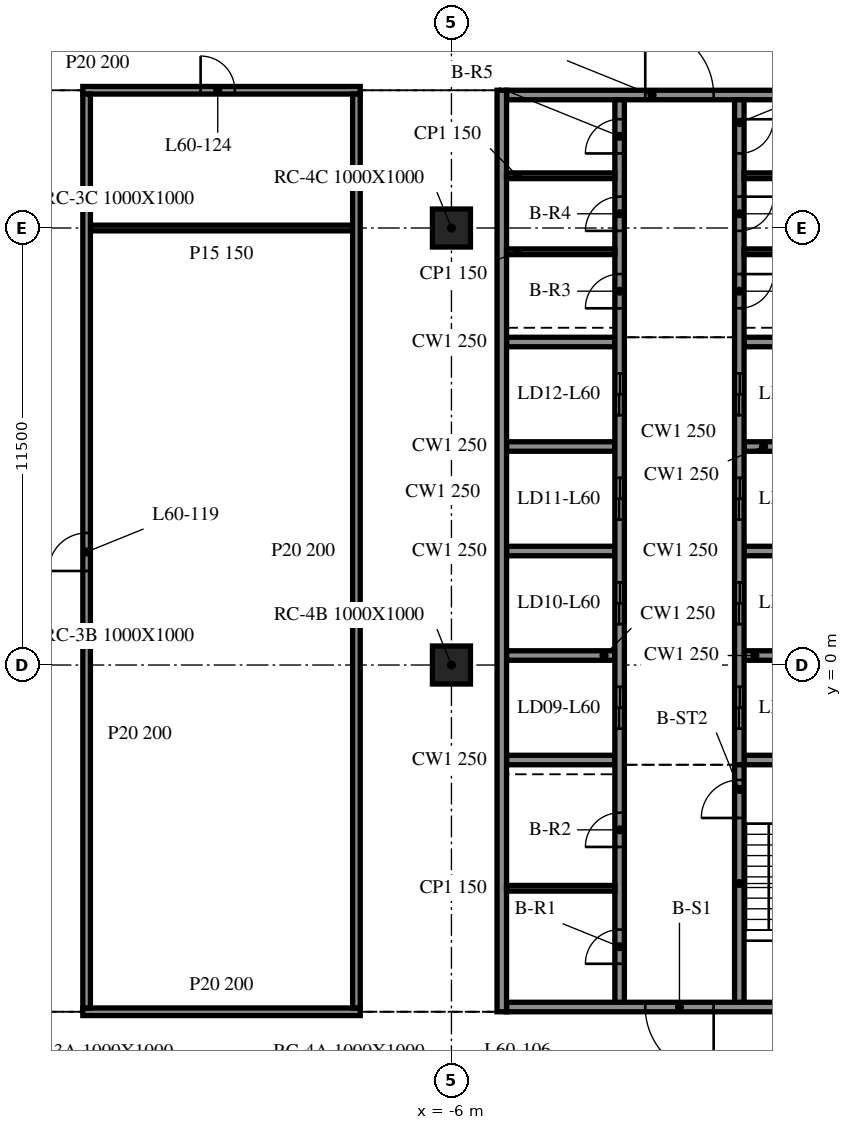
"""IFC4 building model, lengths in metres.
Left out: names, types, materials, properties, quantities, classifications, styles, units other than length and angle.
Written with IfcOpenShell. Run it as: python <this file> out.ifc"""

import sys

from ifc_helpers import new_model, si_unit, direction, frame, frame_2d, origin, origin_2d, place, context, subcontext, project, spatial, rectangle, extrude, element, fill, save


model = new_model("IFC4")
c1 = context("Model", 3, precision=1e-05, world=origin(), true_north=direction((0.0, 1.0)))
c2 = subcontext(c1, "Body", "Model", "MODEL_VIEW")
j1 = project(units=[si_unit("LENGTHUNIT", "METRE"), si_unit("PLANEANGLEUNIT", "RADIAN")], contexts=[c1])
p1 = place(None, origin())
s1 = spatial("IfcSite", under=j1, at=p1, CompositionType="ELEMENT")
p2 = place(p1, origin())
s2 = spatial("IfcBuilding", under=s1, at=p2, CompositionType="ELEMENT")
p3 = place(p2, frame((0.0, 0.0, 247.6)))
s3 = spatial("IfcBuildingStorey", under=s2, at=p3, CompositionType="ELEMENT", Elevation=247.6)
for number, where, z_axis, x_axis in (
    (1, (-6.0, 0.0, -0.34), (0.0, 0.0, 1.0), (1.0, 0.0, 0.0)),
    (2, (-6.0, 11.5, -0.34), (0.0, 0.0, 1.0), (1.0, 0.0, 0.0)),
):
    element("IfcColumn", number, at=place(p3, frame(where, z_axis=z_axis, x_axis=x_axis)), inside=s3, PredefinedType="COLUMN", context=c2, shape_type="SweptSolid", body=[
        extrude(rectangle(XDim=1.0, YDim=1.0, at=origin_2d()), origin(), (0.0, 0.0, 1.0), 3.8),
    ])
p4 = place(p3, frame((-4.675, 15.125, 0.0), z_axis=(0.0, 0.0, 1.0), x_axis=(0.0, -1.0, 0.0)))
e3 = element("IfcWall", 3, at=p4, inside=s3, PredefinedType="SOLIDWALL", context=c2, shape_type="SweptSolid", body=[
    extrude(rectangle(XDim=24.25, YDim=0.25, at=frame_2d((12.125, 0.0))), origin(), (0.0, 0.0, 1.0), 3.46),
])
p5 = place(p3, frame((4.55, -9.0, 0.0), z_axis=(0.0, 0.0, 1.0), x_axis=(-1.0, 0.0, 0.0)))
e4 = element("IfcWall", 4, at=p5, inside=s3, PredefinedType="SOLIDWALL", context=c2, shape_type="SweptSolid", body=[
    extrude(rectangle(XDim=9.1, YDim=0.25, at=frame_2d((4.55, 0.0))), origin(), (0.0, 0.0, 1.0), 3.46),
])
p6 = place(p5, frame((3.65, 0.0, 0.0)))
e5 = element("IfcOpeningElement", 5, at=p6, cuts=e4, PredefinedType="OPENING", context=c2, shape_type="SweptSolid", body=[
    extrude(rectangle(XDim=1.8, YDim=2.1, at=frame_2d((0.9, 1.05))), frame((0.0, 0.135, 0.0), z_axis=(0.0, -1.0, 0.0), x_axis=(1.0, 0.0, 0.0)), (0.0, 0.0, 1.0), 0.27),
])
p7 = place(p3, frame((-4.55, 15.0, 0.0), z_axis=(0.0, 0.0, 1.0), x_axis=(1.0, 0.0, 0.0)))
e6 = element("IfcWall", 6, at=p7, inside=s3, PredefinedType="SOLIDWALL", context=c2, shape_type="SweptSolid", body=[
    extrude(rectangle(XDim=9.1, YDim=0.25, at=frame_2d((4.55, 0.0))), origin(), (0.0, 0.0, 1.0), 3.46),
])
p8 = place(p7, frame((3.65, 0.0, 0.0)))
e7 = element("IfcOpeningElement", 7, at=p8, cuts=e6, PredefinedType="OPENING", context=c2, shape_type="SweptSolid", body=[
    extrude(rectangle(XDim=1.8, YDim=2.1, at=frame_2d((0.9, 1.05))), frame((0.0, 0.135, 0.0), z_axis=(0.0, -1.0, 0.0), x_axis=(1.0, 0.0, 0.0)), (0.0, 0.0, 1.0), 0.27),
])
p9 = place(p3, frame((-1.575, -8.875, 0.0), z_axis=(0.0, 0.0, 1.0), x_axis=(0.0, 1.0, 0.0)))
e8 = element("IfcWall", 8, at=p9, inside=s3, PredefinedType="SOLIDWALL", context=c2, shape_type="SweptSolid", body=[
    extrude(rectangle(XDim=23.75, YDim=0.25, at=frame_2d((11.875, 0.0))), origin(), (0.0, 0.0, 1.0), 3.46),
])
p10 = place(p9, frame((7.2, 0.0, 0.0)))
e9 = element("IfcOpeningElement", 9, at=p10, cuts=e8, PredefinedType="OPENING", context=c2, shape_type="SweptSolid", body=[
    extrude(rectangle(XDim=1.1, YDim=2.1, at=frame_2d((0.55, 1.05))), frame((0.0, 0.135, 0.0), z_axis=(0.0, -1.0, 0.0), x_axis=(1.0, 0.0, 0.0)), (0.0, 0.0, 1.0), 0.27),
])
p11 = place(p9, frame((9.95, 0.0, 0.0)))
e10 = element("IfcOpeningElement", 10, at=p11, cuts=e8, PredefinedType="OPENING", context=c2, shape_type="SweptSolid", body=[
    extrude(rectangle(XDim=1.1, YDim=2.1, at=frame_2d((0.55, 1.05))), frame((0.0, 0.135, 0.0), z_axis=(0.0, -1.0, 0.0), x_axis=(1.0, 0.0, 0.0)), (0.0, 0.0, 1.0), 0.27),
])
p12 = place(p9, frame((12.7, 0.0, 0.0)))
e11 = element("IfcOpeningElement", 11, at=p12, cuts=e8, PredefinedType="OPENING", context=c2, shape_type="SweptSolid", body=[
    extrude(rectangle(XDim=1.1, YDim=2.1, at=frame_2d((0.55, 1.05))), frame((0.0, 0.135, 0.0), z_axis=(0.0, -1.0, 0.0), x_axis=(1.0, 0.0, 0.0)), (0.0, 0.0, 1.0), 0.27),
])
p13 = place(p9, frame((15.45, 0.0, 0.0)))
e12 = element("IfcOpeningElement", 12, at=p13, cuts=e8, PredefinedType="OPENING", context=c2, shape_type="SweptSolid", body=[
    extrude(rectangle(XDim=1.1, YDim=2.1, at=frame_2d((0.55, 1.05))), frame((0.0, 0.135, 0.0), z_axis=(0.0, -1.0, 0.0), x_axis=(1.0, 0.0, 0.0)), (0.0, 0.0, 1.0), 0.27),
])
p14 = place(p9, frame((1.012, 0.0, 0.0)))
e13 = element("IfcOpeningElement", 13, at=p14, cuts=e8, PredefinedType="OPENING", context=c2, shape_type="SweptSolid", body=[
    extrude(rectangle(XDim=0.9, YDim=2.1, at=frame_2d((0.45, 1.05))), frame((0.0, 0.135, 0.0), z_axis=(0.0, -1.0, 0.0), x_axis=(1.0, 0.0, 0.0)), (0.0, 0.0, 1.0), 0.27),
])
p15 = place(p9, frame((4.087, 0.0, 0.0)))
e14 = element("IfcOpeningElement", 14, at=p15, cuts=e8, PredefinedType="OPENING", context=c2, shape_type="SweptSolid", body=[
    extrude(rectangle(XDim=0.9, YDim=2.1, at=frame_2d((0.45, 1.05))), frame((0.0, 0.135, 0.0), z_axis=(0.0, -1.0, 0.0), x_axis=(1.0, 0.0, 0.0)), (0.0, 0.0, 1.0), 0.27),
])
p16 = place(p9, frame((18.262, 0.0, 0.0)))
e15 = element("IfcOpeningElement", 15, at=p16, cuts=e8, PredefinedType="OPENING", context=c2, shape_type="SweptSolid", body=[
    extrude(rectangle(XDim=0.9, YDim=2.1, at=frame_2d((0.45, 1.05))), frame((0.0, 0.135, 0.0), z_axis=(0.0, -1.0, 0.0), x_axis=(1.0, 0.0, 0.0)), (0.0, 0.0, 1.0), 0.27),
])
p17 = place(p9, frame((20.3, 0.0, 0.0)))
e16 = element("IfcOpeningElement", 16, at=p17, cuts=e8, PredefinedType="OPENING", context=c2, shape_type="SweptSolid", body=[
    extrude(rectangle(XDim=0.9, YDim=2.1, at=frame_2d((0.45, 1.05))), frame((0.0, 0.135, 0.0), z_axis=(0.0, -1.0, 0.0), x_axis=(1.0, 0.0, 0.0)), (0.0, 0.0, 1.0), 0.27),
])
p18 = place(p9, frame((22.337, 0.0, 0.0)))
e17 = element("IfcOpeningElement", 17, at=p18, cuts=e8, PredefinedType="OPENING", context=c2, shape_type="SweptSolid", body=[
    extrude(rectangle(XDim=0.9, YDim=2.1, at=frame_2d((0.45, 1.05))), frame((0.0, 0.135, 0.0), z_axis=(0.0, -1.0, 0.0), x_axis=(1.0, 0.0, 0.0)), (0.0, 0.0, 1.0), 0.27),
])
p19 = place(p3, frame((1.575, -8.875, 0.0), z_axis=(0.0, 0.0, 1.0), x_axis=(0.0, 1.0, 0.0)))
e18 = element("IfcWall", 18, at=p19, inside=s3, PredefinedType="SOLIDWALL", context=c2, shape_type="SweptSolid", body=[
    extrude(rectangle(XDim=6.25, YDim=0.25, at=frame_2d((3.125, 0.0))), origin(), (0.0, 0.0, 1.0), 3.46),
])
p20 = place(p19, frame((4.85, 0.0, 0.0)))
e19 = element("IfcOpeningElement", 19, at=p20, cuts=e18, PredefinedType="OPENING", context=c2, shape_type="SweptSolid", body=[
    extrude(rectangle(XDim=1.0, YDim=2.1, at=frame_2d((0.5, 1.05))), frame((0.0, 0.135, 0.0), z_axis=(0.0, -1.0, 0.0), x_axis=(1.0, 0.0, 0.0)), (0.0, 0.0, 1.0), 0.27),
])
p21 = place(p3, frame((1.575, 14.875, 0.0), z_axis=(0.0, 0.0, 1.0), x_axis=(0.0, -1.0, 0.0)))
e20 = element("IfcWall", 20, at=p21, inside=s3, PredefinedType="SOLIDWALL", context=c2, shape_type="SweptSolid", body=[
    extrude(rectangle(XDim=17.5, YDim=0.25, at=frame_2d((8.75, 0.0))), origin(), (0.0, 0.0, 1.0), 3.46),
])
p22 = place(p21, frame((15.45, 0.0, 0.0)))
e21 = element("IfcOpeningElement", 21, at=p22, cuts=e20, PredefinedType="OPENING", context=c2, shape_type="SweptSolid", body=[
    extrude(rectangle(XDim=1.1, YDim=2.1, at=frame_2d((0.55, 1.05))), frame((0.0, 0.135, 0.0), z_axis=(0.0, -1.0, 0.0), x_axis=(1.0, 0.0, 0.0)), (0.0, 0.0, 1.0), 0.27),
])
p23 = place(p21, frame((12.7, 0.0, 0.0)))
e22 = element("IfcOpeningElement", 22, at=p23, cuts=e20, PredefinedType="OPENING", context=c2, shape_type="SweptSolid", body=[
    extrude(rectangle(XDim=1.1, YDim=2.1, at=frame_2d((0.55, 1.05))), frame((0.0, 0.135, 0.0), z_axis=(0.0, -1.0, 0.0), x_axis=(1.0, 0.0, 0.0)), (0.0, 0.0, 1.0), 0.27),
])
p24 = place(p21, frame((9.95, 0.0, 0.0)))
e23 = element("IfcOpeningElement", 23, at=p24, cuts=e20, PredefinedType="OPENING", context=c2, shape_type="SweptSolid", body=[
    extrude(rectangle(XDim=1.1, YDim=2.1, at=frame_2d((0.55, 1.05))), frame((0.0, 0.135, 0.0), z_axis=(0.0, -1.0, 0.0), x_axis=(1.0, 0.0, 0.0)), (0.0, 0.0, 1.0), 0.27),
])
p25 = place(p21, frame((7.2, 0.0, 0.0)))
e24 = element("IfcOpeningElement", 24, at=p25, cuts=e20, PredefinedType="OPENING", context=c2, shape_type="SweptSolid", body=[
    extrude(rectangle(XDim=1.1, YDim=2.1, at=frame_2d((0.55, 1.05))), frame((0.0, 0.135, 0.0), z_axis=(0.0, -1.0, 0.0), x_axis=(1.0, 0.0, 0.0)), (0.0, 0.0, 1.0), 0.27),
])
p26 = place(p21, frame((4.587, 0.0, 0.0)))
e25 = element("IfcOpeningElement", 25, at=p26, cuts=e20, PredefinedType="OPENING", context=c2, shape_type="SweptSolid", body=[
    extrude(rectangle(XDim=0.9, YDim=2.1, at=frame_2d((0.45, 1.05))), frame((0.0, 0.135, 0.0), z_axis=(0.0, -1.0, 0.0), x_axis=(1.0, 0.0, 0.0)), (0.0, 0.0, 1.0), 0.27),
])
p27 = place(p21, frame((2.55, 0.0, 0.0)))
e26 = element("IfcOpeningElement", 26, at=p27, cuts=e20, PredefinedType="OPENING", context=c2, shape_type="SweptSolid", body=[
    extrude(rectangle(XDim=0.9, YDim=2.1, at=frame_2d((0.45, 1.05))), frame((0.0, 0.135, 0.0), z_axis=(0.0, -1.0, 0.0), x_axis=(1.0, 0.0, 0.0)), (0.0, 0.0, 1.0), 0.27),
])
p28 = place(p21, frame((0.512, 0.0, 0.0)))
e27 = element("IfcOpeningElement", 27, at=p28, cuts=e20, PredefinedType="OPENING", context=c2, shape_type="SweptSolid", body=[
    extrude(rectangle(XDim=0.9, YDim=2.1, at=frame_2d((0.45, 1.05))), frame((0.0, 0.135, 0.0), z_axis=(0.0, -1.0, 0.0), x_axis=(1.0, 0.0, 0.0)), (0.0, 0.0, 1.0), 0.27),
])
for number, where, z_axis, x_axis in (
    (28, (-4.55, -2.5, 0.0), (0.0, 0.0, 1.0), (1.0, 0.0, 0.0)),
    (29, (-4.55, 0.25, 0.0), (0.0, 0.0, 1.0), (1.0, 0.0, 0.0)),
    (30, (-4.55, 3.0, 0.0), (0.0, 0.0, 1.0), (1.0, 0.0, 0.0)),
    (31, (-4.55, 5.75, 0.0), (0.0, 0.0, 1.0), (1.0, 0.0, 0.0)),
    (32, (-4.55, 8.5, 0.0), (0.0, 0.0, 1.0), (1.0, 0.0, 0.0)),
    (33, (1.7, -2.5, 0.0), (0.0, 0.0, 1.0), (1.0, 0.0, 0.0)),
    (34, (1.7, 0.25, 0.0), (0.0, 0.0, 1.0), (1.0, 0.0, 0.0)),
    (35, (1.7, 3.0, 0.0), (0.0, 0.0, 1.0), (1.0, 0.0, 0.0)),
    (36, (1.7, 5.75, 0.0), (0.0, 0.0, 1.0), (1.0, 0.0, 0.0)),
    (37, (1.7, 8.5, 0.0), (0.0, 0.0, 1.0), (1.0, 0.0, 0.0)),
):
    element("IfcWall", number, at=place(p3, frame(where, z_axis=z_axis, x_axis=x_axis)), inside=s3, PredefinedType="SOLIDWALL", context=c2, shape_type="SweptSolid", body=[
        extrude(rectangle(XDim=2.85, YDim=0.25, at=frame_2d((1.425, 0.0))), origin(), (0.0, 0.0, 1.0), 3.46),
    ])
for number, where, z_axis, x_axis in (
    (38, (-4.55, -5.875, 0.0), (0.0, 0.0, 1.0), (1.0, 0.0, 0.0)),
    (39, (-4.55, 10.875, 0.0), (0.0, 0.0, 1.0), (1.0, 0.0, 0.0)),
    (40, (-4.55, 12.875, 0.0), (0.0, 0.0, 1.0), (1.0, 0.0, 0.0)),
    (41, (1.7, 10.875, 0.0), (0.0, 0.0, 1.0), (1.0, 0.0, 0.0)),
    (42, (1.7, 12.875, 0.0), (0.0, 0.0, 1.0), (1.0, 0.0, 0.0)),
):
    element("IfcWall", number, at=place(p3, frame(where, z_axis=z_axis, x_axis=x_axis)), inside=s3, PredefinedType="PARTITIONING", context=c2, shape_type="SweptSolid", body=[
        extrude(rectangle(XDim=2.85, YDim=0.15, at=frame_2d((1.425, 0.0))), origin(), (0.0, 0.0, 1.0), 3.46),
    ])
p29 = place(p3, frame((-15.7, -9.125, 0.0), z_axis=(0.0, 0.0, 1.0), x_axis=(1.0, 0.0, 0.0)))
e43 = element("IfcWall", 43, at=p29, inside=s3, PredefinedType="PARTITIONING", context=c2, shape_type="SweptSolid", body=[
    extrude(rectangle(XDim=7.3, YDim=0.2, at=frame_2d((3.65, 0.0))), origin(), (0.0, 0.0, 1.0), 3.46),
])
p30 = place(p3, frame((-15.5, 11.5, 0.0), z_axis=(0.0, 0.0, 1.0), x_axis=(1.0, 0.0, 0.0)))
e44 = element("IfcWall", 44, at=p30, inside=s3, PredefinedType="PARTITIONING", context=c2, shape_type="SweptSolid", body=[
    extrude(rectangle(XDim=6.9, YDim=0.15, at=frame_2d((3.45, 0.0))), origin(), (0.0, 0.0, 1.0), 3.46),
])
p31 = place(p3, frame((-15.7, 15.125, 0.0), z_axis=(0.0, 0.0, 1.0), x_axis=(1.0, 0.0, 0.0)))
e45 = element("IfcWall", 45, at=p31, inside=s3, PredefinedType="PARTITIONING", context=c2, shape_type="SweptSolid", body=[
    extrude(rectangle(XDim=7.3, YDim=0.2, at=frame_2d((3.65, 0.0))), origin(), (0.0, 0.0, 1.0), 3.46),
])
p32 = place(p31, frame((3.1, 0.0, 0.0)))
e46 = element("IfcOpeningElement", 46, at=p32, cuts=e45, PredefinedType="OPENING", context=c2, shape_type="SweptSolid", body=[
    extrude(rectangle(XDim=0.9, YDim=2.1, at=frame_2d((0.45, 1.05))), frame((0.0, 0.11, 0.0), z_axis=(0.0, -1.0, 0.0), x_axis=(1.0, 0.0, 0.0)), (0.0, 0.0, 1.0), 0.22),
])
p33 = place(p3, frame((-15.6, -9.025, 0.0), z_axis=(0.0, 0.0, 1.0), x_axis=(0.0, 1.0, 0.0)))
e47 = element("IfcWall", 47, at=p33, inside=s3, PredefinedType="PARTITIONING", context=c2, shape_type="SweptSolid", body=[
    extrude(rectangle(XDim=24.05, YDim=0.2, at=frame_2d((12.025, 0.0))), origin(), (0.0, 0.0, 1.0), 3.46),
])
p34 = place(p33, frame((11.5, 0.0, 0.0)))
e48 = element("IfcOpeningElement", 48, at=p34, cuts=e47, PredefinedType="OPENING", context=c2, shape_type="SweptSolid", body=[
    extrude(rectangle(XDim=1.0, YDim=2.1, at=frame_2d((0.5, 1.05))), frame((0.0, 0.11, 0.0), z_axis=(0.0, -1.0, 0.0), x_axis=(1.0, 0.0, 0.0)), (0.0, 0.0, 1.0), 0.22),
])
p35 = place(p3, frame((-8.5, -9.025, 0.0), z_axis=(0.0, 0.0, 1.0), x_axis=(0.0, 1.0, 0.0)))
e49 = element("IfcWall", 49, at=p35, inside=s3, PredefinedType="PARTITIONING", context=c2, shape_type="SweptSolid", body=[
    extrude(rectangle(XDim=24.05, YDim=0.2, at=frame_2d((12.025, 0.0))), origin(), (0.0, 0.0, 1.0), 3.46),
])
p36 = place(p6, origin())
e50 = element("IfcDoor", 50, at=p36, inside=s3, OperationType="DOUBLE_DOOR_SINGLE_SWING", PredefinedType="DOOR", context=c2, shape_type="SweptSolid", body=[
    extrude(rectangle(XDim=1.8, YDim=2.1, at=frame_2d((0.9, 1.05))), frame((0.0, 0.025, 0.0), z_axis=(0.0, -1.0, 0.0), x_axis=(1.0, 0.0, 0.0)), (0.0, 0.0, 1.0), 0.05),
])
fill(e5, e50)
p37 = place(p8, origin())
e51 = element("IfcDoor", 51, at=p37, inside=s3, OperationType="DOUBLE_DOOR_SINGLE_SWING", PredefinedType="DOOR", context=c2, shape_type="SweptSolid", body=[
    extrude(rectangle(XDim=1.8, YDim=2.1, at=frame_2d((0.9, 1.05))), frame((0.0, 0.025, 0.0), z_axis=(0.0, -1.0, 0.0), x_axis=(1.0, 0.0, 0.0)), (0.0, 0.0, 1.0), 0.05),
])
fill(e7, e51)
p38 = place(p22, origin())
e52 = element("IfcDoor", 52, at=p38, inside=s3, OperationType="DOUBLE_DOOR_SLIDING", PredefinedType="DOOR", context=c2, shape_type="SweptSolid", body=[
    extrude(rectangle(XDim=1.1, YDim=2.1, at=frame_2d((0.55, 1.05))), frame((0.0, 0.025, 0.0), z_axis=(0.0, -1.0, 0.0), x_axis=(1.0, 0.0, 0.0)), (0.0, 0.0, 1.0), 0.05),
])
fill(e21, e52)
p39 = place(p23, origin())
e53 = element("IfcDoor", 53, at=p39, inside=s3, OperationType="DOUBLE_DOOR_SLIDING", PredefinedType="DOOR", context=c2, shape_type="SweptSolid", body=[
    extrude(rectangle(XDim=1.1, YDim=2.1, at=frame_2d((0.55, 1.05))), frame((0.0, 0.025, 0.0), z_axis=(0.0, -1.0, 0.0), x_axis=(1.0, 0.0, 0.0)), (0.0, 0.0, 1.0), 0.05),
])
fill(e22, e53)
p40 = place(p24, origin())
e54 = element("IfcDoor", 54, at=p40, inside=s3, OperationType="DOUBLE_DOOR_SLIDING", PredefinedType="DOOR", context=c2, shape_type="SweptSolid", body=[
    extrude(rectangle(XDim=1.1, YDim=2.1, at=frame_2d((0.55, 1.05))), frame((0.0, 0.025, 0.0), z_axis=(0.0, -1.0, 0.0), x_axis=(1.0, 0.0, 0.0)), (0.0, 0.0, 1.0), 0.05),
])
fill(e23, e54)
p41 = place(p25, origin())
e55 = element("IfcDoor", 55, at=p41, inside=s3, OperationType="DOUBLE_DOOR_SLIDING", PredefinedType="DOOR", context=c2, shape_type="SweptSolid", body=[
    extrude(rectangle(XDim=1.1, YDim=2.1, at=frame_2d((0.55, 1.05))), frame((0.0, 0.025, 0.0), z_axis=(0.0, -1.0, 0.0), x_axis=(1.0, 0.0, 0.0)), (0.0, 0.0, 1.0), 0.05),
])
fill(e24, e55)
p42 = place(p10, origin())
e56 = element("IfcDoor", 56, at=p42, inside=s3, OperationType="DOUBLE_DOOR_SLIDING", PredefinedType="DOOR", context=c2, shape_type="SweptSolid", body=[
    extrude(rectangle(XDim=1.1, YDim=2.1, at=frame_2d((0.55, 1.05))), frame((0.0, 0.025, 0.0), z_axis=(0.0, -1.0, 0.0), x_axis=(1.0, 0.0, 0.0)), (0.0, 0.0, 1.0), 0.05),
])
fill(e9, e56)
p43 = place(p11, origin())
e57 = element("IfcDoor", 57, at=p43, inside=s3, OperationType="DOUBLE_DOOR_SLIDING", PredefinedType="DOOR", context=c2, shape_type="SweptSolid", body=[
    extrude(rectangle(XDim=1.1, YDim=2.1, at=frame_2d((0.55, 1.05))), frame((0.0, 0.025, 0.0), z_axis=(0.0, -1.0, 0.0), x_axis=(1.0, 0.0, 0.0)), (0.0, 0.0, 1.0), 0.05),
])
fill(e10, e57)
p44 = place(p12, origin())
e58 = element("IfcDoor", 58, at=p44, inside=s3, OperationType="DOUBLE_DOOR_SLIDING", PredefinedType="DOOR", context=c2, shape_type="SweptSolid", body=[
    extrude(rectangle(XDim=1.1, YDim=2.1, at=frame_2d((0.55, 1.05))), frame((0.0, 0.025, 0.0), z_axis=(0.0, -1.0, 0.0), x_axis=(1.0, 0.0, 0.0)), (0.0, 0.0, 1.0), 0.05),
])
fill(e11, e58)
p45 = place(p13, origin())
e59 = element("IfcDoor", 59, at=p45, inside=s3, OperationType="DOUBLE_DOOR_SLIDING", PredefinedType="DOOR", context=c2, shape_type="SweptSolid", body=[
    extrude(rectangle(XDim=1.1, YDim=2.1, at=frame_2d((0.55, 1.05))), frame((0.0, 0.025, 0.0), z_axis=(0.0, -1.0, 0.0), x_axis=(1.0, 0.0, 0.0)), (0.0, 0.0, 1.0), 0.05),
])
fill(e12, e59)
p46 = place(p14, origin())
e60 = element("IfcDoor", 60, at=p46, inside=s3, OperationType="SINGLE_SWING_LEFT", PredefinedType="DOOR", context=c2, shape_type="SweptSolid", body=[
    extrude(rectangle(XDim=0.9, YDim=2.1, at=frame_2d((0.45, 1.05))), frame((0.0, 0.025, 0.0), z_axis=(0.0, -1.0, 0.0), x_axis=(1.0, 0.0, 0.0)), (0.0, 0.0, 1.0), 0.05),
])
fill(e13, e60)
p47 = place(p15, origin())
e61 = element("IfcDoor", 61, at=p47, inside=s3, OperationType="SINGLE_SWING_RIGHT", PredefinedType="DOOR", context=c2, shape_type="SweptSolid", body=[
    extrude(rectangle(XDim=0.9, YDim=2.1, at=frame_2d((0.45, 1.05))), frame((0.0, 0.025, 0.0), z_axis=(0.0, -1.0, 0.0), x_axis=(1.0, 0.0, 0.0)), (0.0, 0.0, 1.0), 0.05),
])
fill(e14, e61)
p48 = place(p16, origin())
e62 = element("IfcDoor", 62, at=p48, inside=s3, OperationType="SINGLE_SWING_LEFT", PredefinedType="DOOR", context=c2, shape_type="SweptSolid", body=[
    extrude(rectangle(XDim=0.9, YDim=2.1, at=frame_2d((0.45, 1.05))), frame((0.0, 0.025, 0.0), z_axis=(0.0, -1.0, 0.0), x_axis=(1.0, 0.0, 0.0)), (0.0, 0.0, 1.0), 0.05),
])
fill(e15, e62)
p49 = place(p17, origin())
e63 = element("IfcDoor", 63, at=p49, inside=s3, OperationType="SINGLE_SWING_RIGHT", PredefinedType="DOOR", context=c2, shape_type="SweptSolid", body=[
    extrude(rectangle(XDim=0.9, YDim=2.1, at=frame_2d((0.45, 1.05))), frame((0.0, 0.025, 0.0), z_axis=(0.0, -1.0, 0.0), x_axis=(1.0, 0.0, 0.0)), (0.0, 0.0, 1.0), 0.05),
])
fill(e16, e63)
p50 = place(p18, origin())
e64 = element("IfcDoor", 64, at=p50, inside=s3, OperationType="SINGLE_SWING_LEFT", PredefinedType="DOOR", context=c2, shape_type="SweptSolid", body=[
    extrude(rectangle(XDim=0.9, YDim=2.1, at=frame_2d((0.45, 1.05))), frame((0.0, 0.025, 0.0), z_axis=(0.0, -1.0, 0.0), x_axis=(1.0, 0.0, 0.0)), (0.0, 0.0, 1.0), 0.05),
])
fill(e17, e64)
p51 = place(p26, origin())
e65 = element("IfcDoor", 65, at=p51, inside=s3, OperationType="SINGLE_SWING_RIGHT", PredefinedType="DOOR", context=c2, shape_type="SweptSolid", body=[
    extrude(rectangle(XDim=0.9, YDim=2.1, at=frame_2d((0.45, 1.05))), frame((0.0, 0.025, 0.0), z_axis=(0.0, -1.0, 0.0), x_axis=(1.0, 0.0, 0.0)), (0.0, 0.0, 1.0), 0.05),
])
fill(e25, e65)
p52 = place(p27, origin())
e66 = element("IfcDoor", 66, at=p52, inside=s3, OperationType="SINGLE_SWING_LEFT", PredefinedType="DOOR", context=c2, shape_type="SweptSolid", body=[
    extrude(rectangle(XDim=0.9, YDim=2.1, at=frame_2d((0.45, 1.05))), frame((0.0, 0.025, 0.0), z_axis=(0.0, -1.0, 0.0), x_axis=(1.0, 0.0, 0.0)), (0.0, 0.0, 1.0), 0.05),
])
fill(e26, e66)
p53 = place(p28, origin())
e67 = element("IfcDoor", 67, at=p53, inside=s3, OperationType="SINGLE_SWING_RIGHT", PredefinedType="DOOR", context=c2, shape_type="SweptSolid", body=[
    extrude(rectangle(XDim=0.9, YDim=2.1, at=frame_2d((0.45, 1.05))), frame((0.0, 0.025, 0.0), z_axis=(0.0, -1.0, 0.0), x_axis=(1.0, 0.0, 0.0)), (0.0, 0.0, 1.0), 0.05),
])
fill(e27, e67)
p54 = place(p20, origin())
e68 = element("IfcDoor", 68, at=p54, inside=s3, OperationType="SINGLE_SWING_LEFT", PredefinedType="DOOR", context=c2, shape_type="SweptSolid", body=[
    extrude(rectangle(XDim=1.0, YDim=2.1, at=frame_2d((0.5, 1.05))), frame((0.0, 0.025, 0.0), z_axis=(0.0, -1.0, 0.0), x_axis=(1.0, 0.0, 0.0)), (0.0, 0.0, 1.0), 0.05),
])
fill(e19, e68)
p55 = place(p34, origin())
e69 = element("IfcDoor", 69, at=p55, inside=s3, OperationType="SINGLE_SWING_RIGHT", PredefinedType="DOOR", context=c2, shape_type="SweptSolid", body=[
    extrude(rectangle(XDim=1.0, YDim=2.1, at=frame_2d((0.5, 1.05))), frame((0.0, 0.025, 0.0), z_axis=(0.0, -1.0, 0.0), x_axis=(1.0, 0.0, 0.0)), (0.0, 0.0, 1.0), 0.05),
])
fill(e48, e69)
p56 = place(p32, origin())
e70 = element("IfcDoor", 70, at=p56, inside=s3, OperationType="SINGLE_SWING_RIGHT", PredefinedType="DOOR", context=c2, shape_type="SweptSolid", body=[
    extrude(rectangle(XDim=0.9, YDim=2.1, at=frame_2d((0.45, 1.05))), frame((0.0, 0.025, 0.0), z_axis=(0.0, -1.0, 0.0), x_axis=(1.0, 0.0, 0.0)), (0.0, 0.0, 1.0), 0.05),
])
fill(e46, e70)
save(model, sys.argv[1])
